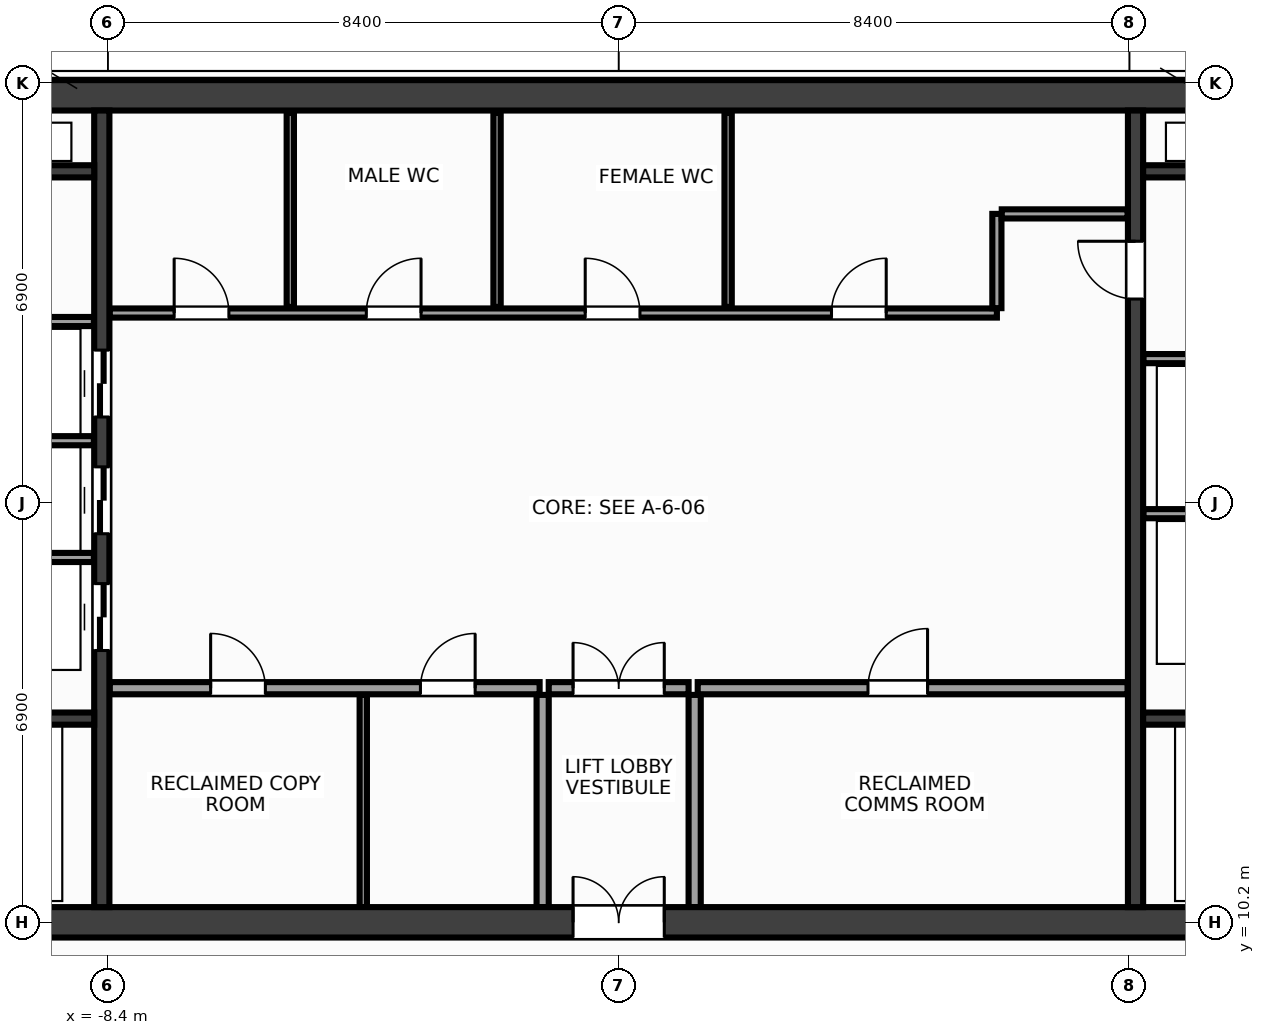
"""IFC4 building model, lengths in metres.
Left out: names, types, materials, properties, quantities, classifications, styles, units other than length and angle.
Written with IfcOpenShell. Run it as: python <this file> out.ifc"""

import sys

from ifc_helpers import new_model, si_unit, direction, frame, frame_2d, origin, place, context, subcontext, project, spatial, rectangle, extrude, source, transform, mapped, element, fill, save


model = new_model("IFC4")
c1 = context("Model", 3, precision=1e-05, world=origin(), true_north=direction((0.0, 1.0)))
c2 = subcontext(c1, "Body", "Model", "MODEL_VIEW")
j1 = project(units=[si_unit("LENGTHUNIT", "METRE"), si_unit("PLANEANGLEUNIT", "RADIAN")], contexts=[c1])
p1 = place(None, origin())
s1 = spatial("IfcSite", under=j1, at=p1, CompositionType="ELEMENT")
p2 = place(p1, origin())
s2 = spatial("IfcBuilding", under=s1, at=p2, CompositionType="ELEMENT")
p3 = place(p2, frame((0.0, 0.0, 236.0)))
s3 = spatial("IfcBuildingStorey", under=s2, at=p3, CompositionType="ELEMENT", Elevation=236.0)
m1 = source(origin(), c2, "Body", "SweptSolid", [
    extrude(rectangle(XDim=31.7, YDim=0.5, at=frame_2d((15.85, 0.0))), origin(), (0.0, 0.0, 1.0), 3.6),
])
p4 = place(p3, frame((-15.85, 23.8, 0.0), z_axis=(0.0, 0.0, 1.0), x_axis=(1.0, 0.0, 0.0)))
e1 = element("IfcWall", 1, at=p4, inside=s3, PredefinedType="SHEAR", context=c2, shape_type="MappedRepresentation", body=[
    mapped(m1, transform((0.0, 0.0, 0.0), x_axis=(1.0, 0.0, 0.0), y_axis=(0.0, 1.0, 0.0), z_axis=(0.0, 0.0, 1.0), scale=1.0)),
])
p5 = place(p3, frame((-15.85, 10.2, 0.0), z_axis=(0.0, 0.0, 1.0), x_axis=(1.0, 0.0, 0.0)))
e2 = element("IfcWall", 2, at=p5, inside=s3, PredefinedType="SHEAR", context=c2, shape_type="MappedRepresentation", body=[
    mapped(m1, transform((0.0, 0.0, 0.0), x_axis=(1.0, 0.0, 0.0), y_axis=(0.0, 1.0, 0.0), z_axis=(0.0, 0.0, 1.0), scale=1.0)),
])
p6 = place(p5, frame((1.7, 0.0, 0.0)))
e3 = element("IfcOpeningElement", 3, at=p6, cuts=e2, PredefinedType="OPENING", context=c2, shape_type="SweptSolid", body=[
    extrude(rectangle(XDim=1.6, YDim=2.15, at=frame_2d((0.8, 1.075))), frame((0.0, 0.262, 0.0), z_axis=(0.0, -1.0, 0.0), x_axis=(1.0, 0.0, 0.0)), (0.0, 0.0, 1.0), 0.524),
])
p7 = place(p5, frame((28.4, 0.0, 0.0)))
e4 = element("IfcOpeningElement", 4, at=p7, cuts=e2, PredefinedType="OPENING", context=c2, shape_type="SweptSolid", body=[
    extrude(rectangle(XDim=1.6, YDim=2.15, at=frame_2d((0.8, 1.075))), frame((0.0, 0.262, 0.0), z_axis=(0.0, -1.0, 0.0), x_axis=(1.0, 0.0, 0.0)), (0.0, 0.0, 1.0), 0.524),
])
p8 = place(p5, frame((15.1, 0.0, 0.0)))
e5 = element("IfcOpeningElement", 5, at=p8, cuts=e2, PredefinedType="OPENING", context=c2, shape_type="SweptSolid", body=[
    extrude(rectangle(XDim=1.5, YDim=2.2, at=frame_2d((0.75, 1.1))), frame((0.0, 0.262, 0.0), z_axis=(0.0, -1.0, 0.0), x_axis=(1.0, 0.0, 0.0)), (0.0, 0.0, 1.0), 0.524),
])
m2 = source(origin(), c2, "Body", "SweptSolid", [
    extrude(rectangle(XDim=13.1, YDim=0.25, at=frame_2d((6.55, 0.0))), origin(), (0.0, 0.0, 1.0), 3.6),
])
p9 = place(p3, frame((-8.5, 10.45, 0.0), z_axis=(0.0, 0.0, 1.0), x_axis=(0.0, 1.0, 0.0)))
e6 = element("IfcWall", 6, at=p9, inside=s3, PredefinedType="SHEAR", context=c2, shape_type="MappedRepresentation", body=[
    mapped(m2, transform((0.0, 0.0, 0.0), x_axis=(1.0, 0.0, 0.0), y_axis=(0.0, 1.0, 0.0), z_axis=(0.0, 0.0, 1.0), scale=1.0)),
])
p10 = place(p9, frame((4.22, 0.0, 0.0)))
e7 = element("IfcOpeningElement", 7, at=p10, cuts=e6, PredefinedType="OPENING", context=c2, shape_type="SweptSolid", body=[
    extrude(rectangle(XDim=1.1, YDim=2.15, at=frame_2d((0.55, 1.075))), frame((0.0, 0.137, 0.0), z_axis=(0.0, -1.0, 0.0), x_axis=(1.0, 0.0, 0.0)), (0.0, 0.0, 1.0), 0.274),
])
p11 = place(p9, frame((6.14, 0.0, 0.0)))
e8 = element("IfcOpeningElement", 8, at=p11, cuts=e6, PredefinedType="OPENING", context=c2, shape_type="SweptSolid", body=[
    extrude(rectangle(XDim=1.1, YDim=2.15, at=frame_2d((0.55, 1.075))), frame((0.0, 0.137, 0.0), z_axis=(0.0, -1.0, 0.0), x_axis=(1.0, 0.0, 0.0)), (0.0, 0.0, 1.0), 0.274),
])
p12 = place(p9, frame((8.06, 0.0, 0.0)))
e9 = element("IfcOpeningElement", 9, at=p12, cuts=e6, PredefinedType="OPENING", context=c2, shape_type="SweptSolid", body=[
    extrude(rectangle(XDim=1.1, YDim=2.15, at=frame_2d((0.55, 1.075))), frame((0.0, 0.137, 0.0), z_axis=(0.0, -1.0, 0.0), x_axis=(1.0, 0.0, 0.0)), (0.0, 0.0, 1.0), 0.274),
])
p13 = place(p3, frame((8.5, 10.45, 0.0), z_axis=(0.0, 0.0, 1.0), x_axis=(0.0, 1.0, 0.0)))
e10 = element("IfcWall", 10, at=p13, inside=s3, PredefinedType="SHEAR", context=c2, shape_type="MappedRepresentation", body=[
    mapped(m2, transform((0.0, 0.0, 0.0), x_axis=(1.0, 0.0, 0.0), y_axis=(0.0, 1.0, 0.0), z_axis=(0.0, 0.0, 1.0), scale=1.0)),
])
p14 = place(p13, frame((10.0, 0.0, 0.0)))
e11 = element("IfcOpeningElement", 11, at=p14, cuts=e10, PredefinedType="OPENING", context=c2, shape_type="SweptSolid", body=[
    extrude(rectangle(XDim=0.95, YDim=2.15, at=frame_2d((0.475, 1.075))), frame((0.0, 0.137, 0.0), z_axis=(0.0, -1.0, 0.0), x_axis=(1.0, 0.0, 0.0)), (0.0, 0.0, 1.0), 0.274),
])
m3 = source(origin(), c2, "Body", "SweptSolid", [
    extrude(rectangle(XDim=2.825, YDim=0.2, at=frame_2d((1.413, 0.0))), origin(), (0.0, 0.0, 1.0), 3.6),
])
for number, where, z_axis, x_axis in (
    (12, (-11.45, 13.55, 0.0), (0.0, 0.0, 1.0), (1.0, 0.0, 0.0)),
    (13, (8.625, 13.55, 0.0), (0.0, 0.0, 1.0), (1.0, 0.0, 0.0)),
):
    element("IfcWall", number, at=place(p3, frame(where, z_axis=z_axis, x_axis=x_axis)), inside=s3, PredefinedType="SHEAR", context=c2, shape_type="MappedRepresentation", body=[
        mapped(m3, transform((0.0, 0.0, 0.0), x_axis=(1.0, 0.0, 0.0), y_axis=(0.0, 1.0, 0.0), z_axis=(0.0, 0.0, 1.0), scale=1.0)),
    ])
m4 = source(origin(), c2, "Body", "SweptSolid", [
    extrude(rectangle(XDim=3.02, YDim=0.2, at=frame_2d((1.51, 0.0))), origin(), (0.0, 0.0, 1.0), 3.6),
])
for number, where, z_axis, x_axis in (
    (14, (-11.645, 22.55, 0.0), (0.0, 0.0, 1.0), (1.0, 0.0, 0.0)),
    (15, (8.625, 22.55, 0.0), (0.0, 0.0, 1.0), (1.0, 0.0, 0.0)),
):
    element("IfcWall", number, at=place(p3, frame(where, z_axis=z_axis, x_axis=x_axis)), inside=s3, PredefinedType="SHEAR", context=c2, shape_type="MappedRepresentation", body=[
        mapped(m4, transform((0.0, 0.0, 0.0), x_axis=(1.0, 0.0, 0.0), y_axis=(0.0, 1.0, 0.0), z_axis=(0.0, 0.0, 1.0), scale=1.0)),
    ])
m5 = source(origin(), c2, "Body", "SweptSolid", [
    extrude(rectangle(XDim=3.01, YDim=0.15, at=frame_2d((1.505, 0.0))), origin(), (0.0, 0.0, 1.0), 3.37),
])
for number, where, z_axis, x_axis in (
    (16, (-11.64, 16.2, 0.0), (0.0, 0.0, 1.0), (1.0, 0.0, 0.0)),
    (17, (-11.64, 18.12, 0.0), (0.0, 0.0, 1.0), (1.0, 0.0, 0.0)),
    (18, (-11.64, 20.08, 0.0), (0.0, 0.0, 1.0), (1.0, 0.0, 0.0)),
    (19, (8.63, 16.92, 0.0), (0.0, 0.0, 1.0), (1.0, 0.0, 0.0)),
    (20, (8.63, 19.47, 0.0), (0.0, 0.0, 1.0), (1.0, 0.0, 0.0)),
):
    element("IfcWall", number, at=place(p3, frame(where, z_axis=z_axis, x_axis=x_axis)), inside=s3, PredefinedType="PARTITIONING", context=c2, shape_type="MappedRepresentation", body=[
        mapped(m5, transform((0.0, 0.0, 0.0), x_axis=(1.0, 0.0, 0.0), y_axis=(0.0, 1.0, 0.0), z_axis=(0.0, 0.0, 1.0), scale=1.0)),
    ])
m6 = source(origin(), c2, "Body", "SweptSolid", [
    extrude(rectangle(XDim=7.07, YDim=0.2, at=frame_2d((3.535, 0.0))), origin(), (0.0, 0.0, 1.0), 3.37),
])
p15 = place(p3, frame((-8.37, 14.05, 0.0), z_axis=(0.0, 0.0, 1.0), x_axis=(1.0, 0.0, 0.0)))
e21 = element("IfcWall", 21, at=p15, inside=s3, PredefinedType="PARTITIONING", context=c2, shape_type="MappedRepresentation", body=[
    mapped(m6, transform((0.0, 0.0, 0.0), x_axis=(1.0, 0.0, 0.0), y_axis=(0.0, 1.0, 0.0), z_axis=(0.0, 0.0, 1.0), scale=1.0)),
])
p16 = place(p15, frame((1.66, 0.0, 0.0)))
e22 = element("IfcOpeningElement", 22, at=p16, cuts=e21, PredefinedType="OPENING", context=c2, shape_type="SweptSolid", body=[
    extrude(rectangle(XDim=0.9, YDim=2.15, at=frame_2d((0.45, 1.075))), frame((0.0, 0.112, 0.0), z_axis=(0.0, -1.0, 0.0), x_axis=(1.0, 0.0, 0.0)), (0.0, 0.0, 1.0), 0.224),
])
p17 = place(p15, frame((5.11, 0.0, 0.0)))
e23 = element("IfcOpeningElement", 23, at=p17, cuts=e21, PredefinedType="OPENING", context=c2, shape_type="SweptSolid", body=[
    extrude(rectangle(XDim=0.9, YDim=2.15, at=frame_2d((0.45, 1.075))), frame((0.0, 0.112, 0.0), z_axis=(0.0, -1.0, 0.0), x_axis=(1.0, 0.0, 0.0)), (0.0, 0.0, 1.0), 0.224),
])
p18 = place(p3, frame((1.3, 14.05, 0.0), z_axis=(0.0, 0.0, 1.0), x_axis=(1.0, 0.0, 0.0)))
e24 = element("IfcWall", 24, at=p18, inside=s3, PredefinedType="PARTITIONING", context=c2, shape_type="MappedRepresentation", body=[
    mapped(m6, transform((0.0, 0.0, 0.0), x_axis=(1.0, 0.0, 0.0), y_axis=(0.0, 1.0, 0.0), z_axis=(0.0, 0.0, 1.0), scale=1.0)),
])
p19 = place(p18, frame((2.8, 0.0, 0.0)))
e25 = element("IfcOpeningElement", 25, at=p19, cuts=e24, PredefinedType="OPENING", context=c2, shape_type="SweptSolid", body=[
    extrude(rectangle(XDim=0.98, YDim=2.15, at=frame_2d((0.49, 1.075))), frame((0.0, 0.112, 0.0), z_axis=(0.0, -1.0, 0.0), x_axis=(1.0, 0.0, 0.0)), (0.0, 0.0, 1.0), 0.224),
])
m7 = source(origin(), c2, "Body", "SweptSolid", [
    extrude(rectangle(XDim=3.49, YDim=0.2, at=frame_2d((1.745, 0.0))), origin(), (0.0, 0.0, 1.0), 3.37),
])
for number, where, z_axis, x_axis in (
    (26, (-1.25, 10.45, 0.0), (0.0, 0.0, 1.0), (0.0, 1.0, 0.0)),
    (27, (1.25, 10.45, 0.0), (0.0, 0.0, 1.0), (0.0, 1.0, 0.0)),
):
    element("IfcWall", number, at=place(p3, frame(where, z_axis=z_axis, x_axis=x_axis)), inside=s3, PredefinedType="PARTITIONING", context=c2, shape_type="MappedRepresentation", body=[
        mapped(m7, transform((0.0, 0.0, 0.0), x_axis=(1.0, 0.0, 0.0), y_axis=(0.0, 1.0, 0.0), z_axis=(0.0, 0.0, 1.0), scale=1.0)),
    ])
m8 = source(origin(), c2, "Body", "SweptSolid", [
    extrude(rectangle(XDim=2.3, YDim=0.2, at=frame_2d((1.15, 0.0))), origin(), (0.0, 0.0, 1.0), 3.37),
])
p20 = place(p3, frame((-1.15, 14.05, 0.0), z_axis=(0.0, 0.0, 1.0), x_axis=(1.0, 0.0, 0.0)))
e28 = element("IfcWall", 28, at=p20, inside=s3, PredefinedType="PARTITIONING", context=c2, shape_type="MappedRepresentation", body=[
    mapped(m8, transform((0.0, 0.0, 0.0), x_axis=(1.0, 0.0, 0.0), y_axis=(0.0, 1.0, 0.0), z_axis=(0.0, 0.0, 1.0), scale=1.0)),
])
p21 = place(p20, frame((0.4, 0.0, 0.0)))
e29 = element("IfcOpeningElement", 29, at=p21, cuts=e28, PredefinedType="OPENING", context=c2, shape_type="SweptSolid", body=[
    extrude(rectangle(XDim=1.5, YDim=2.2, at=frame_2d((0.75, 1.1))), frame((0.0, 0.112, 0.0), z_axis=(0.0, -1.0, 0.0), x_axis=(1.0, 0.0, 0.0)), (0.0, 0.0, 1.0), 0.224),
])
m9 = source(origin(), c2, "Body", "SweptSolid", [
    extrude(rectangle(XDim=14.59, YDim=0.15, at=frame_2d((7.295, 0.0))), origin(), (0.0, 0.0, 1.0), 3.37),
])
p22 = place(p3, frame((-8.37, 20.22, 0.0), z_axis=(0.0, 0.0, 1.0), x_axis=(1.0, 0.0, 0.0)))
e30 = element("IfcWall", 30, at=p22, inside=s3, PredefinedType="PARTITIONING", context=c2, shape_type="MappedRepresentation", body=[
    mapped(m9, transform((0.0, 0.0, 0.0), x_axis=(1.0, 0.0, 0.0), y_axis=(0.0, 1.0, 0.0), z_axis=(0.0, 0.0, 1.0), scale=1.0)),
])
p23 = place(p22, frame((1.06, 0.0, 0.0)))
e31 = element("IfcOpeningElement", 31, at=p23, cuts=e30, PredefinedType="OPENING", context=c2, shape_type="SweptSolid", body=[
    extrude(rectangle(XDim=0.9, YDim=2.15, at=frame_2d((0.45, 1.075))), frame((0.0, 0.087, 0.0), z_axis=(0.0, -1.0, 0.0), x_axis=(1.0, 0.0, 0.0)), (0.0, 0.0, 1.0), 0.174),
])
p24 = place(p22, frame((4.22, 0.0, 0.0)))
e32 = element("IfcOpeningElement", 32, at=p24, cuts=e30, PredefinedType="OPENING", context=c2, shape_type="SweptSolid", body=[
    extrude(rectangle(XDim=0.9, YDim=2.15, at=frame_2d((0.45, 1.075))), frame((0.0, 0.087, 0.0), z_axis=(0.0, -1.0, 0.0), x_axis=(1.0, 0.0, 0.0)), (0.0, 0.0, 1.0), 0.174),
])
p25 = place(p22, frame((7.82, 0.0, 0.0)))
e33 = element("IfcOpeningElement", 33, at=p25, cuts=e30, PredefinedType="OPENING", context=c2, shape_type="SweptSolid", body=[
    extrude(rectangle(XDim=0.9, YDim=2.15, at=frame_2d((0.45, 1.075))), frame((0.0, 0.087, 0.0), z_axis=(0.0, -1.0, 0.0), x_axis=(1.0, 0.0, 0.0)), (0.0, 0.0, 1.0), 0.174),
])
p26 = place(p22, frame((11.87, 0.0, 0.0)))
e34 = element("IfcOpeningElement", 34, at=p26, cuts=e30, PredefinedType="OPENING", context=c2, shape_type="SweptSolid", body=[
    extrude(rectangle(XDim=0.9, YDim=2.15, at=frame_2d((0.45, 1.075))), frame((0.0, 0.087, 0.0), z_axis=(0.0, -1.0, 0.0), x_axis=(1.0, 0.0, 0.0)), (0.0, 0.0, 1.0), 0.174),
])
m10 = source(origin(), c2, "Body", "SweptSolid", [
    extrude(rectangle(XDim=1.55, YDim=0.15, at=frame_2d((0.775, 0.0))), origin(), (0.0, 0.0, 1.0), 3.37),
])
p27 = place(p3, frame((6.22, 20.3, 0.0), z_axis=(0.0, 0.0, 1.0), x_axis=(0.0, 1.0, 0.0)))
e35 = element("IfcWall", 35, at=p27, inside=s3, PredefinedType="PARTITIONING", context=c2, shape_type="MappedRepresentation", body=[
    mapped(m10, transform((0.0, 0.0, 0.0), x_axis=(1.0, 0.0, 0.0), y_axis=(0.0, 1.0, 0.0), z_axis=(0.0, 0.0, 1.0), scale=1.0)),
])
m11 = source(origin(), c2, "Body", "SweptSolid", [
    extrude(rectangle(XDim=2.07, YDim=0.15, at=frame_2d((1.035, 0.0))), origin(), (0.0, 0.0, 1.0), 3.37),
])
p28 = place(p3, frame((6.3, 21.85, 0.0), z_axis=(0.0, 0.0, 1.0), x_axis=(1.0, 0.0, 0.0)))
e36 = element("IfcWall", 36, at=p28, inside=s3, PredefinedType="PARTITIONING", context=c2, shape_type="MappedRepresentation", body=[
    mapped(m11, transform((0.0, 0.0, 0.0), x_axis=(1.0, 0.0, 0.0), y_axis=(0.0, 1.0, 0.0), z_axis=(0.0, 0.0, 1.0), scale=1.0)),
])
m12 = source(origin(), c2, "Body", "SweptSolid", [
    extrude(rectangle(XDim=3.49, YDim=0.12, at=frame_2d((1.745, 0.0))), origin(), (0.0, 0.0, 1.0), 3.37),
])
p29 = place(p3, frame((-4.2, 10.45, 0.0), z_axis=(0.0, 0.0, 1.0), x_axis=(0.0, 1.0, 0.0)))
e37 = element("IfcWall", 37, at=p29, inside=s3, PredefinedType="PARTITIONING", context=c2, shape_type="MappedRepresentation", body=[
    mapped(m12, transform((0.0, 0.0, 0.0), x_axis=(1.0, 0.0, 0.0), y_axis=(0.0, 1.0, 0.0), z_axis=(0.0, 0.0, 1.0), scale=1.0)),
])
m13 = source(origin(), c2, "Body", "SweptSolid", [
    extrude(rectangle(XDim=3.19, YDim=0.12, at=frame_2d((1.595, 0.0))), origin(), (0.0, 0.0, 1.0), 3.37),
])
for number, where, z_axis, x_axis in (
    (38, (-5.4, 20.32, 0.0), (0.0, 0.0, 1.0), (0.0, 1.0, 0.0)),
    (39, (-2.0, 20.32, 0.0), (0.0, 0.0, 1.0), (0.0, 1.0, 0.0)),
    (40, (1.8, 20.32, 0.0), (0.0, 0.0, 1.0), (0.0, 1.0, 0.0)),
):
    element("IfcWall", number, at=place(p3, frame(where, z_axis=z_axis, x_axis=x_axis)), inside=s3, PredefinedType="PARTITIONING", context=c2, shape_type="MappedRepresentation", body=[
        mapped(m13, transform((0.0, 0.0, 0.0), x_axis=(1.0, 0.0, 0.0), y_axis=(0.0, 1.0, 0.0), z_axis=(0.0, 0.0, 1.0), scale=1.0)),
    ])
m14 = source(origin(), c2, "Body", "SweptSolid", [
    extrude(rectangle(XDim=1.1, YDim=2.15, at=frame_2d((0.55, 1.075))), frame((0.0, 0.025, 0.0), z_axis=(0.0, -1.0, 0.0), x_axis=(1.0, 0.0, 0.0)), (0.0, 0.0, 1.0), 0.05),
])
p30 = place(p10, origin())
e41 = element("IfcDoor", 41, at=p30, inside=s3, OperationType="DOUBLE_DOOR_SLIDING", PredefinedType="DOOR", context=c2, shape_type="MappedRepresentation", body=[
    mapped(m14, transform((0.0, 0.0, 0.0), x_axis=(1.0, 0.0, 0.0), y_axis=(0.0, 1.0, 0.0), z_axis=(0.0, 0.0, 1.0), scale=1.0)),
])
fill(e7, e41)
p31 = place(p11, origin())
e42 = element("IfcDoor", 42, at=p31, inside=s3, OperationType="DOUBLE_DOOR_SLIDING", PredefinedType="DOOR", context=c2, shape_type="MappedRepresentation", body=[
    mapped(m14, transform((0.0, 0.0, 0.0), x_axis=(1.0, 0.0, 0.0), y_axis=(0.0, 1.0, 0.0), z_axis=(0.0, 0.0, 1.0), scale=1.0)),
])
fill(e8, e42)
p32 = place(p12, origin())
e43 = element("IfcDoor", 43, at=p32, inside=s3, OperationType="DOUBLE_DOOR_SLIDING", PredefinedType="DOOR", context=c2, shape_type="MappedRepresentation", body=[
    mapped(m14, transform((0.0, 0.0, 0.0), x_axis=(1.0, 0.0, 0.0), y_axis=(0.0, 1.0, 0.0), z_axis=(0.0, 0.0, 1.0), scale=1.0)),
])
fill(e9, e43)
m15 = source(origin(), c2, "Body", "SweptSolid", [
    extrude(rectangle(XDim=0.95, YDim=2.15, at=frame_2d((0.475, 1.075))), frame((0.0, 0.025, 0.0), z_axis=(0.0, -1.0, 0.0), x_axis=(1.0, 0.0, 0.0)), (0.0, 0.0, 1.0), 0.05),
])
p33 = place(p14, origin())
e44 = element("IfcDoor", 44, at=p33, inside=s3, OperationType="SINGLE_SWING_RIGHT", PredefinedType="DOOR", context=c2, shape_type="MappedRepresentation", body=[
    mapped(m15, transform((0.0, 0.0, 0.0), x_axis=(1.0, 0.0, 0.0), y_axis=(0.0, 1.0, 0.0), z_axis=(0.0, 0.0, 1.0), scale=1.0)),
])
fill(e11, e44)
m16 = source(origin(), c2, "Body", "SweptSolid", [
    extrude(rectangle(XDim=0.9, YDim=2.15, at=frame_2d((0.45, 1.075))), frame((0.0, 0.025, 0.0), z_axis=(0.0, -1.0, 0.0), x_axis=(1.0, 0.0, 0.0)), (0.0, 0.0, 1.0), 0.05),
])
p34 = place(p16, origin())
e45 = element("IfcDoor", 45, at=p34, inside=s3, OperationType="SINGLE_SWING_LEFT", PredefinedType="DOOR", context=c2, shape_type="MappedRepresentation", body=[
    mapped(m16, transform((0.0, 0.0, 0.0), x_axis=(1.0, 0.0, 0.0), y_axis=(0.0, 1.0, 0.0), z_axis=(0.0, 0.0, 1.0), scale=1.0)),
])
fill(e22, e45)
p35 = place(p17, origin())
e46 = element("IfcDoor", 46, at=p35, inside=s3, OperationType="SINGLE_SWING_RIGHT", PredefinedType="DOOR", context=c2, shape_type="MappedRepresentation", body=[
    mapped(m16, transform((0.0, 0.0, 0.0), x_axis=(1.0, 0.0, 0.0), y_axis=(0.0, 1.0, 0.0), z_axis=(0.0, 0.0, 1.0), scale=1.0)),
])
fill(e23, e46)
m17 = source(origin(), c2, "Body", "SweptSolid", [
    extrude(rectangle(XDim=0.98, YDim=2.15, at=frame_2d((0.49, 1.075))), frame((0.0, 0.025, 0.0), z_axis=(0.0, -1.0, 0.0), x_axis=(1.0, 0.0, 0.0)), (0.0, 0.0, 1.0), 0.05),
])
p36 = place(p19, origin())
e47 = element("IfcDoor", 47, at=p36, inside=s3, OperationType="SINGLE_SWING_RIGHT", PredefinedType="DOOR", context=c2, shape_type="MappedRepresentation", body=[
    mapped(m17, transform((0.0, 0.0, 0.0), x_axis=(1.0, 0.0, 0.0), y_axis=(0.0, 1.0, 0.0), z_axis=(0.0, 0.0, 1.0), scale=1.0)),
])
fill(e25, e47)
m18 = source(origin(), c2, "Body", "SweptSolid", [
    extrude(rectangle(XDim=1.5, YDim=2.2, at=frame_2d((0.75, 1.1))), frame((0.0, 0.025, 0.0), z_axis=(0.0, -1.0, 0.0), x_axis=(1.0, 0.0, 0.0)), (0.0, 0.0, 1.0), 0.05),
])
p37 = place(p21, origin())
e48 = element("IfcDoor", 48, at=p37, inside=s3, OperationType="DOUBLE_DOOR_SINGLE_SWING", PredefinedType="DOOR", context=c2, shape_type="MappedRepresentation", body=[
    mapped(m18, transform((0.0, 0.0, 0.0), x_axis=(1.0, 0.0, 0.0), y_axis=(0.0, 1.0, 0.0), z_axis=(0.0, 0.0, 1.0), scale=1.0)),
])
fill(e29, e48)
p38 = place(p8, origin())
e49 = element("IfcDoor", 49, at=p38, inside=s3, OperationType="DOUBLE_DOOR_SINGLE_SWING", PredefinedType="DOOR", context=c2, shape_type="MappedRepresentation", body=[
    mapped(m18, transform((0.0, 0.0, 0.0), x_axis=(1.0, 0.0, 0.0), y_axis=(0.0, 1.0, 0.0), z_axis=(0.0, 0.0, 1.0), scale=1.0)),
])
fill(e5, e49)
p39 = place(p23, origin())
e50 = element("IfcDoor", 50, at=p39, inside=s3, OperationType="SINGLE_SWING_LEFT", PredefinedType="DOOR", context=c2, shape_type="MappedRepresentation", body=[
    mapped(m16, transform((0.0, 0.0, 0.0), x_axis=(1.0, 0.0, 0.0), y_axis=(0.0, 1.0, 0.0), z_axis=(0.0, 0.0, 1.0), scale=1.0)),
])
fill(e31, e50)
p40 = place(p24, origin())
e51 = element("IfcDoor", 51, at=p40, inside=s3, OperationType="SINGLE_SWING_RIGHT", PredefinedType="DOOR", context=c2, shape_type="MappedRepresentation", body=[
    mapped(m16, transform((0.0, 0.0, 0.0), x_axis=(1.0, 0.0, 0.0), y_axis=(0.0, 1.0, 0.0), z_axis=(0.0, 0.0, 1.0), scale=1.0)),
])
fill(e32, e51)
p41 = place(p25, origin())
e52 = element("IfcDoor", 52, at=p41, inside=s3, OperationType="SINGLE_SWING_LEFT", PredefinedType="DOOR", context=c2, shape_type="MappedRepresentation", body=[
    mapped(m16, transform((0.0, 0.0, 0.0), x_axis=(1.0, 0.0, 0.0), y_axis=(0.0, 1.0, 0.0), z_axis=(0.0, 0.0, 1.0), scale=1.0)),
])
fill(e33, e52)
p42 = place(p26, origin())
e53 = element("IfcDoor", 53, at=p42, inside=s3, OperationType="SINGLE_SWING_RIGHT", PredefinedType="DOOR", context=c2, shape_type="MappedRepresentation", body=[
    mapped(m16, transform((0.0, 0.0, 0.0), x_axis=(1.0, 0.0, 0.0), y_axis=(0.0, 1.0, 0.0), z_axis=(0.0, 0.0, 1.0), scale=1.0)),
])
fill(e34, e53)
save(model, sys.argv[1])
